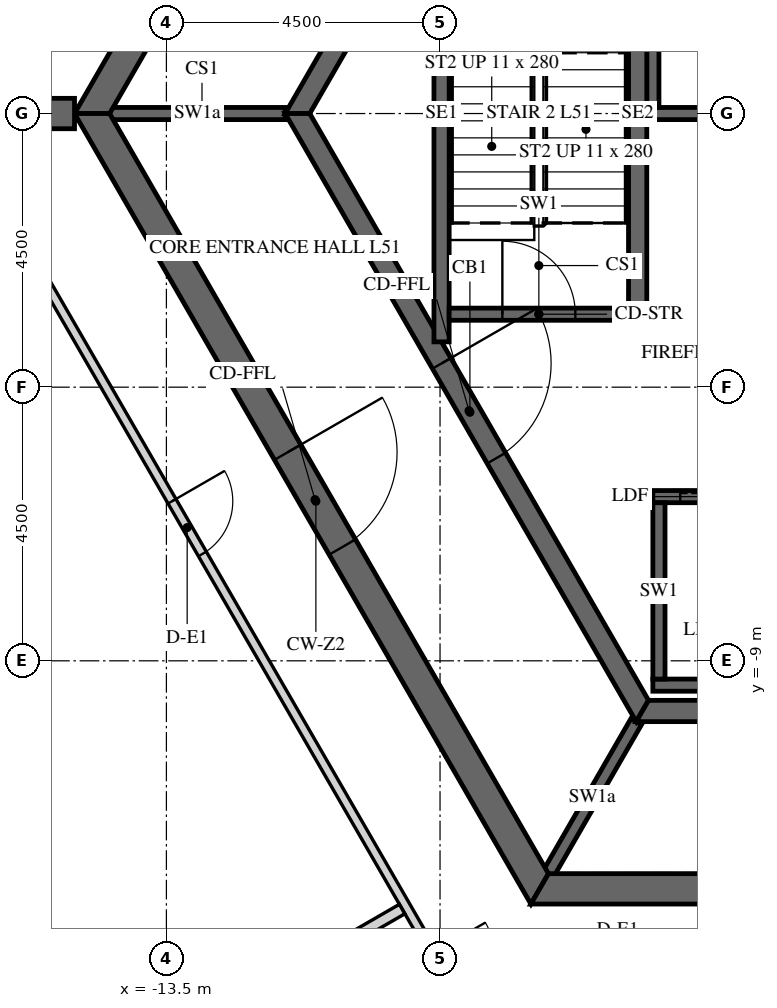
"""IFC4 building model, lengths in metres.
Left out: names, types, materials, properties, quantities, classifications, styles, units other than length and angle.
Written with IfcOpenShell. Run it as: python <this file> out.ifc"""

import sys

from ifc_helpers import new_model, si_unit, direction, frame, frame_2d, origin, place, context, subcontext, project, spatial, polyline, rectangle, outline, extrude, element, fill, save


model = new_model("IFC4")
c1 = context("Model", 3, precision=1e-05, world=origin(), true_north=direction((0.0, 1.0)))
c2 = subcontext(c1, "Body", "Model", "MODEL_VIEW")
j1 = project(units=[si_unit("LENGTHUNIT", "METRE"), si_unit("PLANEANGLEUNIT", "RADIAN")], contexts=[c1])
p1 = place(None, origin())
s1 = spatial("IfcSite", under=j1, at=p1, CompositionType="ELEMENT")
p2 = place(p1, origin())
s2 = spatial("IfcBuilding", under=s1, at=p2, CompositionType="ELEMENT")
p3 = place(p2, frame((0.0, 0.0, 215.1)))
s3 = spatial("IfcBuildingStorey", under=s2, at=p3, CompositionType="ELEMENT", Elevation=215.1)
p4 = place(p3, frame((-7.361, 12.75, -0.15), z_axis=(0.0, 0.0, 1.0), x_axis=(-0.50000571537, -0.866022103989, 0.0)))
e1 = element("IfcWall", 1, at=p4, inside=s3, PredefinedType="SHEAR", context=c2, shape_type="SweptSolid", body=[
    extrude(outline(polyline([(-0.144, -0.25), (14.867, -0.25), (14.578, 0.25), (0.144, 0.25), (-0.144, -0.25)])), origin(), (0.0, 0.0, 1.0), 3.9),
])
p5 = place(p4, frame((6.49, 0.0, 0.15)))
e2 = element("IfcOpeningElement", 2, at=p5, cuts=e1, PredefinedType="OPENING", context=c2, shape_type="SweptSolid", body=[
    extrude(rectangle(XDim=1.8, YDim=2.4, at=frame_2d((0.9, 1.2))), frame((0.0, 0.26, 0.0), z_axis=(0.0, -1.0, 0.0), x_axis=(1.0, 0.0, 0.0)), (0.0, 0.0, 1.0), 0.52),
])
p6 = place(p3, frame((-14.722, 0.0, -0.15), z_axis=(0.0, 0.0, 1.0), x_axis=(0.50000571537, -0.866022103989, 0.0)))
e3 = element("IfcWall", 3, at=p6, inside=s3, PredefinedType="SHEAR", context=c2, shape_type="SweptSolid", body=[
    extrude(outline(polyline([(-0.144, -0.25), (14.867, -0.25), (14.578, 0.25), (0.144, 0.25), (-0.144, -0.25)])), origin(), (0.0, 0.0, 1.0), 3.9),
])
p7 = place(p6, frame((6.432, 0.0, 0.15)))
e4 = element("IfcOpeningElement", 4, at=p7, cuts=e3, PredefinedType="OPENING", context=c2, shape_type="SweptSolid", body=[
    extrude(rectangle(XDim=1.8, YDim=2.4, at=frame_2d((0.9, 1.2))), frame((0.0, 0.26, 0.0), z_axis=(0.0, -1.0, 0.0), x_axis=(1.0, 0.0, 0.0)), (0.0, 0.0, 1.0), 0.52),
])
p8 = place(p3, frame((-7.361, -12.75, -0.15), z_axis=(0.0, 0.0, 1.0), x_axis=(1.0, 0.0, 0.0)))
e5 = element("IfcWall", 5, at=p8, inside=s3, PredefinedType="SHEAR", context=c2, shape_type="SweptSolid", body=[
    extrude(outline(polyline([(-0.144, -0.25), (14.866, -0.25), (14.578, 0.25), (0.144, 0.25), (-0.144, -0.25)])), origin(), (0.0, 0.0, 1.0), 3.9),
])
p9 = place(p8, frame((6.761, 0.0, 0.15)))
e6 = element("IfcOpeningElement", 6, at=p9, cuts=e5, PredefinedType="OPENING", context=c2, shape_type="SweptSolid", body=[
    extrude(rectangle(XDim=1.2, YDim=2.4, at=frame_2d((0.6, 1.2))), frame((0.0, 0.26, 0.0), z_axis=(0.0, -1.0, 0.0), x_axis=(1.0, 0.0, 0.0)), (0.0, 0.0, 1.0), 0.52),
])
p10 = place(p3, frame((-15.011, 0.0, -0.15), z_axis=(0.0, 0.0, 1.0), x_axis=(-1.0, 0.0, 0.0)))
e7 = element("IfcWall", 7, at=p10, inside=s3, PredefinedType="SHEAR", context=c2, shape_type="SweptSolid", body=[
    extrude(rectangle(XDim=15.424, YDim=0.5, at=frame_2d((7.712, 0.0))), origin(), (0.0, 0.0, 1.0), 3.9),
])
p11 = place(p10, frame((6.812, 0.0, 0.15)))
e8 = element("IfcOpeningElement", 8, at=p11, cuts=e7, PredefinedType="OPENING", context=c2, shape_type="SweptSolid", body=[
    extrude(rectangle(XDim=1.8, YDim=2.4, at=frame_2d((0.9, 1.2))), frame((0.0, 0.26, 0.0), z_axis=(0.0, -1.0, 0.0), x_axis=(1.0, 0.0, 0.0)), (0.0, 0.0, 1.0), 0.52),
])
p12 = place(p3, frame((-5.673, 9.825, -0.15), z_axis=(0.0, 0.0, 1.0), x_axis=(-0.499995046907, -0.866028263435, 0.0)))
e9 = element("IfcWall", 9, at=p12, inside=s3, PredefinedType="SHEAR", context=c2, shape_type="SweptSolid", body=[
    extrude(outline(polyline([(-0.101, -0.175), (11.446, -0.175), (11.244, 0.175), (0.101, 0.175), (-0.101, -0.175)])), origin(), (0.0, 0.0, 1.0), 3.9),
])
p13 = place(p12, frame((4.801, 0.0, 0.15)))
e10 = element("IfcOpeningElement", 10, at=p13, cuts=e9, PredefinedType="OPENING", context=c2, shape_type="SweptSolid", body=[
    extrude(rectangle(XDim=1.8, YDim=2.4, at=frame_2d((0.9, 1.2))), frame((0.0, 0.185, 0.0), z_axis=(0.0, -1.0, 0.0), x_axis=(1.0, 0.0, 0.0)), (0.0, 0.0, 1.0), 0.37),
])
p14 = place(p3, frame((-11.345, 0.0, -0.15), z_axis=(0.0, 0.0, 1.0), x_axis=(0.499995046907, -0.866028263435, 0.0)))
e11 = element("IfcWall", 11, at=p14, inside=s3, PredefinedType="SHEAR", context=c2, shape_type="SweptSolid", body=[
    extrude(outline(polyline([(-0.101, -0.175), (11.446, -0.175), (11.244, 0.175), (0.101, 0.175), (-0.101, -0.175)])), origin(), (0.0, 0.0, 1.0), 3.9),
])
p15 = place(p14, frame((4.744, 0.0, 0.15)))
e12 = element("IfcOpeningElement", 12, at=p15, cuts=e11, PredefinedType="OPENING", context=c2, shape_type="SweptSolid", body=[
    extrude(rectangle(XDim=1.8, YDim=2.4, at=frame_2d((0.9, 1.2))), frame((0.0, 0.185, 0.0), z_axis=(0.0, -1.0, 0.0), x_axis=(1.0, 0.0, 0.0)), (0.0, 0.0, 1.0), 0.37),
])
p16 = place(p3, frame((-5.673, -9.825, -0.15), z_axis=(0.0, 0.0, 1.0), x_axis=(1.0, 0.0, 0.0)))
e13 = element("IfcWall", 13, at=p16, inside=s3, PredefinedType="SHEAR", context=c2, shape_type="SweptSolid", body=[
    extrude(outline(polyline([(-0.101, -0.175), (11.446, -0.175), (11.244, 0.175), (0.101, 0.175), (-0.101, -0.175)])), origin(), (0.0, 0.0, 1.0), 3.9),
])
p17 = place(p3, frame((-5.6, 0.0, -0.25), z_axis=(0.0, 0.0, 1.0), x_axis=(1.0, 0.0, 0.0)))
e14 = element("IfcWall", 14, at=p17, inside=s3, PredefinedType="SHEAR", context=c2, shape_type="SweptSolid", body=[
    extrude(rectangle(XDim=11.2, YDim=0.2, at=frame_2d((5.6, 0.0))), origin(), (0.0, 0.0, 1.0), 3.9),
])
p18 = place(p3, frame((-5.5, 0.1, -0.25), z_axis=(0.0, 0.0, 1.0), x_axis=(0.0, 1.0, 0.0)))
e15 = element("IfcWall", 15, at=p18, inside=s3, PredefinedType="SHEAR", context=c2, shape_type="SweptSolid", body=[
    extrude(rectangle(XDim=3.1, YDim=0.2, at=frame_2d((1.55, 0.0))), origin(), (0.0, 0.0, 1.0), 3.9),
])
p19 = place(p3, frame((-5.5, -6.3, -0.25), z_axis=(0.0, 0.0, 1.0), x_axis=(1.0, 0.0, 0.0)))
e16 = element("IfcWall", 16, at=p19, inside=s3, PredefinedType="SHEAR", context=c2, shape_type="SweptSolid", body=[
    extrude(rectangle(XDim=9.2, YDim=0.2, at=frame_2d((4.6, 0.0))), origin(), (0.0, 0.0, 1.0), 3.9),
])
p20 = place(p19, frame((0.45, 0.0, 0.25)))
e17 = element("IfcOpeningElement", 17, at=p20, cuts=e16, PredefinedType="OPENING", context=c2, shape_type="SweptSolid", body=[
    extrude(rectangle(XDim=1.1, YDim=2.1, at=frame_2d((0.55, 1.05))), frame((0.0, 0.11, 0.0), z_axis=(0.0, -1.0, 0.0), x_axis=(1.0, 0.0, 0.0)), (0.0, 0.0, 1.0), 0.22),
])
p21 = place(p19, frame((2.25, 0.0, 0.25)))
e18 = element("IfcOpeningElement", 18, at=p21, cuts=e16, PredefinedType="OPENING", context=c2, shape_type="SweptSolid", body=[
    extrude(rectangle(XDim=1.1, YDim=2.1, at=frame_2d((0.55, 1.05))), frame((0.0, 0.11, 0.0), z_axis=(0.0, -1.0, 0.0), x_axis=(1.0, 0.0, 0.0)), (0.0, 0.0, 1.0), 0.22),
])
p22 = place(p19, frame((4.05, 0.0, 0.25)))
e19 = element("IfcOpeningElement", 19, at=p22, cuts=e16, PredefinedType="OPENING", context=c2, shape_type="SweptSolid", body=[
    extrude(rectangle(XDim=1.1, YDim=2.1, at=frame_2d((0.55, 1.05))), frame((0.0, 0.11, 0.0), z_axis=(0.0, -1.0, 0.0), x_axis=(1.0, 0.0, 0.0)), (0.0, 0.0, 1.0), 0.22),
])
p23 = place(p19, frame((5.85, 0.0, 0.25)))
e20 = element("IfcOpeningElement", 20, at=p23, cuts=e16, PredefinedType="OPENING", context=c2, shape_type="SweptSolid", body=[
    extrude(rectangle(XDim=1.1, YDim=2.1, at=frame_2d((0.55, 1.05))), frame((0.0, 0.11, 0.0), z_axis=(0.0, -1.0, 0.0), x_axis=(1.0, 0.0, 0.0)), (0.0, 0.0, 1.0), 0.22),
])
p24 = place(p19, frame((7.65, 0.0, 0.25)))
e21 = element("IfcOpeningElement", 21, at=p24, cuts=e16, PredefinedType="OPENING", context=c2, shape_type="SweptSolid", body=[
    extrude(rectangle(XDim=1.1, YDim=2.1, at=frame_2d((0.55, 1.05))), frame((0.0, 0.11, 0.0), z_axis=(0.0, -1.0, 0.0), x_axis=(1.0, 0.0, 0.0)), (0.0, 0.0, 1.0), 0.22),
])
p25 = place(p3, frame((-5.5, -9.4, -0.25), z_axis=(0.0, 0.0, 1.0), x_axis=(1.0, 0.0, 0.0)))
e22 = element("IfcWall", 22, at=p25, inside=s3, PredefinedType="SHEAR", context=c2, shape_type="SweptSolid", body=[
    extrude(rectangle(XDim=9.2, YDim=0.2, at=frame_2d((4.6, 0.0))), origin(), (0.0, 0.0, 1.0), 3.9),
])
p26 = place(p3, frame((-5.4, -9.3, -0.25), z_axis=(0.0, 0.0, 1.0), x_axis=(0.0, 1.0, 0.0)))
e23 = element("IfcWall", 23, at=p26, inside=s3, PredefinedType="SHEAR", context=c2, shape_type="SweptSolid", body=[
    extrude(rectangle(XDim=2.9, YDim=0.2, at=frame_2d((1.45, 0.0))), origin(), (0.0, 0.0, 1.0), 3.9),
])
for number, where, z_axis, x_axis in (
    (24, (-11.547, 0.0, -0.15), (0.0, 0.0, 1.0), (-1.0, 0.0, 0.0)),
    (25, (-5.773, -10.0, -0.15), (0.0, 0.0, 1.0), (-0.5, -0.866, 0.0)),
):
    element("IfcWall", number, at=place(p3, frame(where, z_axis=z_axis, x_axis=x_axis)), inside=s3, PredefinedType="SHEAR", context=c2, shape_type="SweptSolid", body=[
        extrude(rectangle(XDim=2.887, YDim=0.2, at=frame_2d((1.443, 0.0))), origin(), (0.0, 0.0, 1.0), 3.9),
    ])
p27 = place(p3, frame((-5.75, -3.4, -0.25), z_axis=(0.0, 0.0, 1.0), x_axis=(0.0, 1.0, 0.0)))
e26 = element("IfcWall", 26, at=p27, inside=s3, PredefinedType="SHEAR", context=c2, shape_type="SweptSolid", body=[
    extrude(rectangle(XDim=6.8, YDim=0.3, at=frame_2d((3.4, 0.0))), origin(), (0.0, 0.0, 1.0), 3.9),
])
p28 = place(p3, frame((-8.975, -3.755, -0.25), z_axis=(0.0, 0.0, 1.0), x_axis=(0.0, 1.0, 0.0)))
e27 = element("IfcWall", 27, at=p28, inside=s3, PredefinedType="SHEAR", context=c2, shape_type="SweptSolid", body=[
    extrude(rectangle(XDim=7.51, YDim=0.25, at=frame_2d((3.755, 0.0))), origin(), (0.0, 0.0, 1.0), 3.9),
])
p29 = place(p3, frame((-8.85, -3.3, -0.25), z_axis=(0.0, 0.0, 1.0), x_axis=(1.0, 0.0, 0.0)))
e28 = element("IfcWall", 28, at=p29, inside=s3, PredefinedType="SHEAR", context=c2, shape_type="SweptSolid", body=[
    extrude(rectangle(XDim=2.95, YDim=0.2, at=frame_2d((1.475, 0.0))), origin(), (0.0, 0.0, 1.0), 3.9),
])
p30 = place(p29, frame((0.875, 0.0, 0.25)))
e29 = element("IfcOpeningElement", 29, at=p30, cuts=e28, PredefinedType="OPENING", context=c2, shape_type="SweptSolid", body=[
    extrude(rectangle(XDim=1.2, YDim=2.4, at=frame_2d((0.6, 1.2))), frame((0.0, 0.11, 0.0), z_axis=(0.0, -1.0, 0.0), x_axis=(1.0, 0.0, 0.0)), (0.0, 0.0, 1.0), 0.22),
])
p31 = place(p3, frame((-15.863, -2.125, 0.0), z_axis=(0.0, 0.0, 1.0), x_axis=(0.500008833422, -0.866020303746, 0.0)))
e30 = element("IfcWall", 30, at=p31, inside=s3, PredefinedType="PARTITIONING", context=c2, shape_type="SweptSolid", body=[
    extrude(rectangle(XDim=14.636, YDim=0.15, at=frame_2d((7.318, 0.0))), origin(), (0.0, 0.0, 1.0), 2.988),
])
p32 = place(p31, frame((4.909, 0.0, 0.0)))
e31 = element("IfcOpeningElement", 31, at=p32, cuts=e30, PredefinedType="OPENING", context=c2, shape_type="SweptSolid", body=[
    extrude(rectangle(XDim=1.0, YDim=2.1, at=frame_2d((0.5, 1.05))), frame((0.0, 0.085, 0.0), z_axis=(0.0, -1.0, 0.0), x_axis=(1.0, 0.0, 0.0)), (0.0, 0.0, 1.0), 0.17),
])
p33 = place(p31, frame((13.486, 0.0, 0.0)))
e32 = element("IfcOpeningElement", 32, at=p33, cuts=e30, PredefinedType="OPENING", context=c2, shape_type="SweptSolid", body=[
    extrude(rectangle(XDim=1.0, YDim=2.1, at=frame_2d((0.5, 1.05))), frame((0.0, 0.085, 0.0), z_axis=(0.0, -1.0, 0.0), x_axis=(1.0, 0.0, 0.0)), (0.0, 0.0, 1.0), 0.17),
])
p34 = place(p3, frame((-20.513, -19.37, 0.0), z_axis=(0.0, 0.0, 1.0), x_axis=(0.866019402111, 0.500010395058, 0.0)))
e33 = element("IfcWall", 33, at=p34, inside=s3, PredefinedType="PARTITIONING", context=c2, shape_type="SweptSolid", body=[
    extrude(rectangle(XDim=12.575, YDim=0.18, at=frame_2d((6.288, 0.0))), origin(), (0.0, 0.0, 1.0), 2.988),
])
p35 = place(p7, origin())
e34 = element("IfcDoor", 34, at=p35, inside=s3, OperationType="DOUBLE_DOOR_SINGLE_SWING", PredefinedType="DOOR", context=c2, shape_type="SweptSolid", body=[
    extrude(rectangle(XDim=1.8, YDim=2.4, at=frame_2d((0.9, 1.2))), frame((0.0, 0.025, 0.0), z_axis=(0.0, -1.0, 0.0), x_axis=(1.0, 0.0, 0.0)), (0.0, 0.0, 1.0), 0.05),
])
fill(e4, e34)
p36 = place(p15, origin())
e35 = element("IfcDoor", 35, at=p36, inside=s3, OperationType="DOUBLE_DOOR_SINGLE_SWING", PredefinedType="DOOR", context=c2, shape_type="SweptSolid", body=[
    extrude(rectangle(XDim=1.8, YDim=2.4, at=frame_2d((0.9, 1.2))), frame((0.0, 0.025, 0.0), z_axis=(0.0, -1.0, 0.0), x_axis=(1.0, 0.0, 0.0)), (0.0, 0.0, 1.0), 0.05),
])
fill(e12, e35)
p37 = place(p30, origin())
e36 = element("IfcDoor", 36, at=p37, inside=s3, OperationType="SINGLE_SWING_LEFT", PredefinedType="DOOR", context=c2, shape_type="SweptSolid", body=[
    extrude(rectangle(XDim=1.2, YDim=2.4, at=frame_2d((0.6, 1.2))), frame((0.0, 0.025, 0.0), z_axis=(0.0, -1.0, 0.0), x_axis=(1.0, 0.0, 0.0)), (0.0, 0.0, 1.0), 0.05),
])
fill(e29, e36)
p38 = place(p20, origin())
e37 = element("IfcDoor", 37, at=p38, inside=s3, OperationType="SLIDING_TO_LEFT", PredefinedType="DOOR", context=c2, shape_type="SweptSolid", body=[
    extrude(rectangle(XDim=1.1, YDim=2.1, at=frame_2d((0.55, 1.05))), frame((0.0, 0.025, 0.0), z_axis=(0.0, -1.0, 0.0), x_axis=(1.0, 0.0, 0.0)), (0.0, 0.0, 1.0), 0.05),
])
fill(e17, e37)
p39 = place(p32, origin())
e38 = element("IfcDoor", 38, at=p39, inside=s3, OperationType="SINGLE_SWING_RIGHT", PredefinedType="DOOR", context=c2, shape_type="SweptSolid", body=[
    extrude(rectangle(XDim=1.0, YDim=2.1, at=frame_2d((0.5, 1.05))), frame((0.0, 0.025, 0.0), z_axis=(0.0, -1.0, 0.0), x_axis=(1.0, 0.0, 0.0)), (0.0, 0.0, 1.0), 0.05),
])
fill(e31, e38)
save(model, sys.argv[1])
